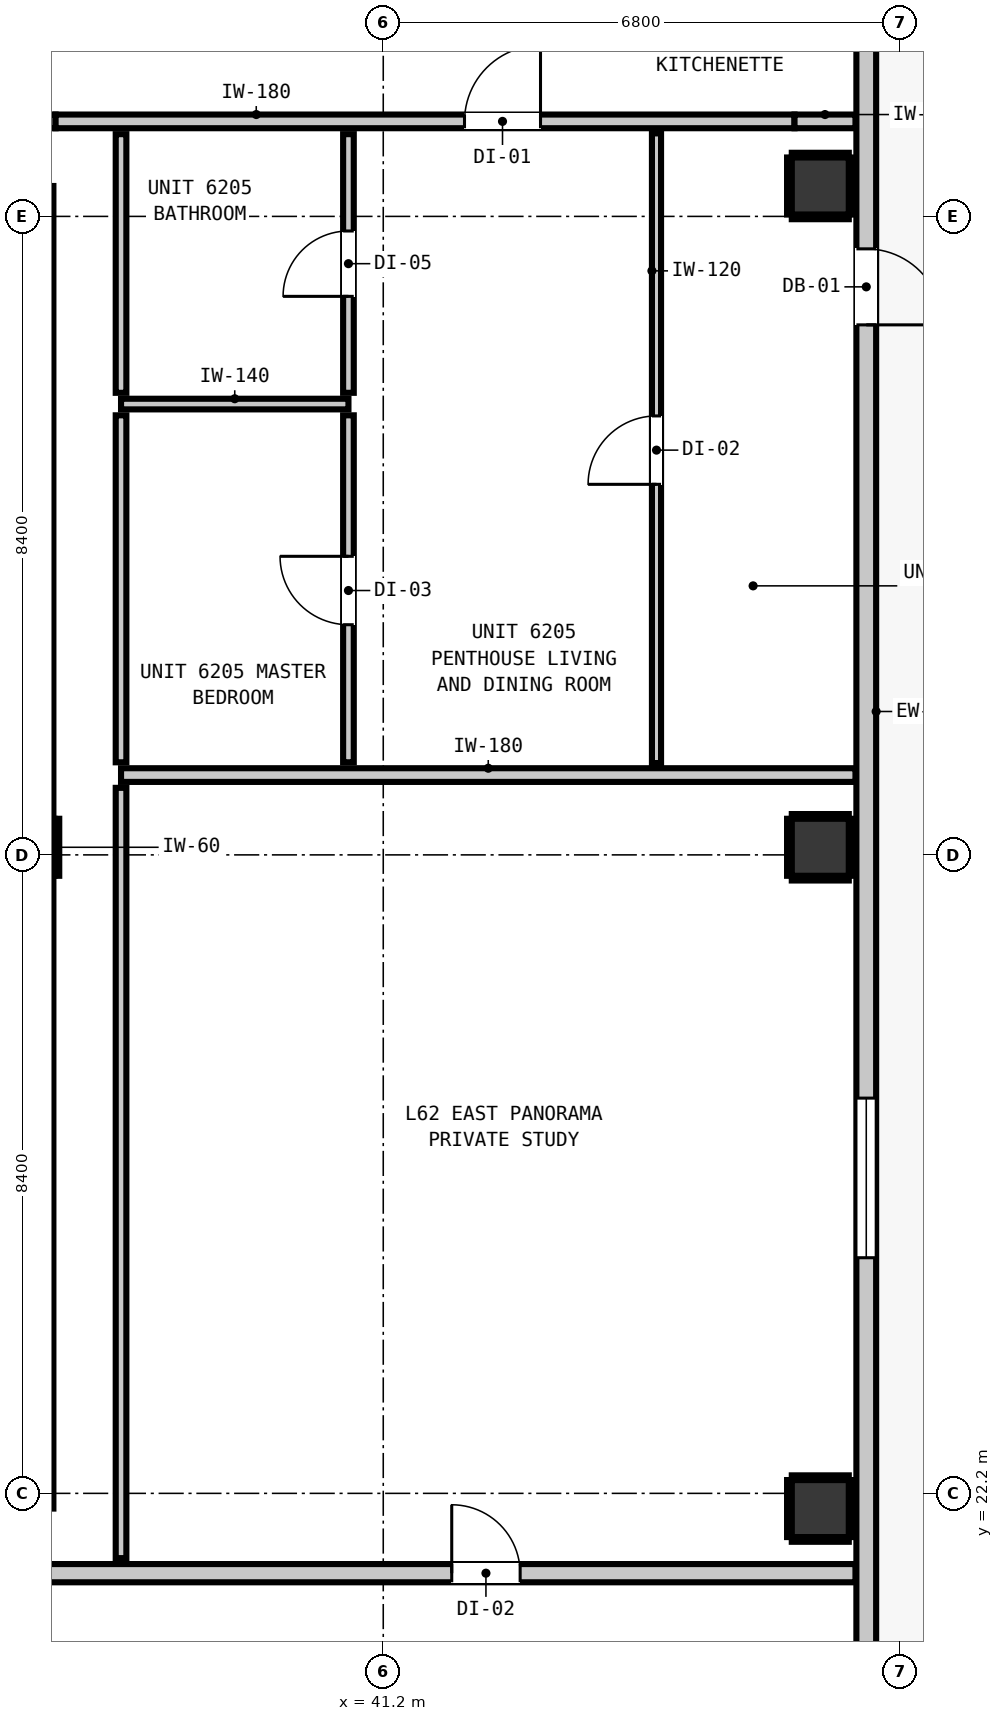
"""IFC4 building model, lengths in metres.
Left out: names, types, materials, properties, quantities, classifications, styles, units other than length and angle.
Written with IfcOpenShell. Run it as: python <this file> out.ifc"""

import sys

from ifc_helpers import new_model, si_unit, direction, frame, frame_2d, origin, origin_2d, place, context, subcontext, project, spatial, rectangle, extrude, element, fill, save


model = new_model("IFC4")
c1 = context("Model", 3, precision=1e-05, world=origin(), true_north=direction((0.0, 1.0)))
c2 = subcontext(c1, "Body", "Model", "MODEL_VIEW")
j1 = project(units=[si_unit("LENGTHUNIT", "METRE"), si_unit("PLANEANGLEUNIT", "RADIAN")], contexts=[c1])
p1 = place(None, origin())
s1 = spatial("IfcSite", under=j1, at=p1, CompositionType="ELEMENT")
p2 = place(p1, origin())
s2 = spatial("IfcBuilding", under=s1, at=p2, CompositionType="ELEMENT")
p3 = place(p2, frame((0.0, 0.0, 213.4)))
s3 = spatial("IfcBuildingStorey", under=s2, at=p3, CompositionType="ELEMENT", Elevation=213.4)
p4 = place(p3, frame((36.5, 30.7, 0.0), z_axis=(0.0, 0.0, 1.0), x_axis=(1.0, 0.0, 0.0)))
e1 = element("IfcColumn", 1, at=p4, inside=s3, PredefinedType="COLUMN", context=c2, shape_type="SweptSolid", body=[
    extrude(rectangle(XDim=0.75, YDim=0.75, at=origin_2d()), origin(), (0.0, 0.0, 1.0), 3.32),
])
p5 = place(p3, frame((36.46, 22.0, 0.0), z_axis=(0.0, 0.0, 1.0), x_axis=(0.0, 1.0, 0.0)))
e2 = element("IfcWall", 2, at=p5, inside=s3, PredefinedType="SHEAR", context=c2, shape_type="SweptSolid", body=[
    extrude(rectangle(XDim=8.32, YDim=0.8, at=frame_2d((4.16, 0.0))), origin(), (0.0, 0.0, 1.0), 3.32),
])
p6 = place(p3, frame((36.46, 31.08, 0.0), z_axis=(0.0, 0.0, 1.0), x_axis=(0.0, 1.0, 0.0)))
e3 = element("IfcWall", 3, at=p6, inside=s3, PredefinedType="SHEAR", context=c2, shape_type="SweptSolid", body=[
    extrude(rectangle(XDim=8.32, YDim=0.8, at=frame_2d((4.16, 0.0))), origin(), (0.0, 0.0, 1.0), 3.32),
])
for number, where, z_axis, x_axis in (
    (4, (46.95, 22.0, 0.0), (0.0, 0.0, 1.0), (1.0, 0.0, 0.0)),
    (5, (46.95, 30.7, 0.0), (0.0, 0.0, 1.0), (1.0, 0.0, 0.0)),
    (6, (46.95, 39.4, 0.0), (0.0, 0.0, 1.0), (1.0, 0.0, 0.0)),
):
    element("IfcColumn", number, at=place(p3, frame(where, z_axis=z_axis, x_axis=x_axis)), inside=s3, PredefinedType="COLUMN", context=c2, shape_type="SweptSolid", body=[
        extrude(rectangle(XDim=0.75, YDim=0.75, at=origin_2d()), origin(), (0.0, 0.0, 1.0), 3.32),
    ])
p7 = place(p3, frame((47.555, 42.655, 0.0), z_axis=(0.0, 0.0, 1.0), x_axis=(0.0, -1.0, 0.0)))
e7 = element("IfcWall", 7, at=p7, inside=s3, PredefinedType="STANDARD", context=c2, shape_type="SweptSolid", body=[
    extrude(rectangle(XDim=30.31, YDim=0.26, at=frame_2d((15.155, 0.0))), origin(), (0.0, 0.0, 1.0), 3.1),
])
p8 = place(p7, frame((4.082, 0.0, 0.0)))
e8 = element("IfcOpeningElement", 8, at=p8, cuts=e7, PredefinedType="OPENING", context=c2, shape_type="SweptSolid", body=[
    extrude(rectangle(XDim=1.0, YDim=2.15, at=frame_2d((0.5, 1.075))), frame((0.0, 0.14, 0.0), z_axis=(0.0, -1.0, 0.0), x_axis=(1.0, 0.0, 0.0)), (0.0, 0.0, 1.0), 0.28),
])
p9 = place(p7, frame((24.101, 0.0, 0.85)))
e9 = element("IfcOpeningElement", 9, at=p9, cuts=e7, PredefinedType="OPENING", context=c2, shape_type="SweptSolid", body=[
    extrude(rectangle(XDim=2.1, YDim=1.9, at=frame_2d((1.05, 0.95))), frame((0.0, 0.14, 0.0), z_axis=(0.0, -1.0, 0.0), x_axis=(1.0, 0.0, 0.0)), (0.0, 0.0, 1.0), 0.28),
])
p10 = place(p7, frame((27.658, 0.0, 0.85)))
e10 = element("IfcOpeningElement", 10, at=p10, cuts=e7, PredefinedType="OPENING", context=c2, shape_type="SweptSolid", body=[
    extrude(rectangle(XDim=2.1, YDim=1.9, at=frame_2d((1.05, 0.95))), frame((0.0, 0.14, 0.0), z_axis=(0.0, -1.0, 0.0), x_axis=(1.0, 0.0, 0.0)), (0.0, 0.0, 1.0), 0.28),
])
p11 = place(p7, frame((15.255, 0.0, 0.85)))
e11 = element("IfcOpeningElement", 11, at=p11, cuts=e7, PredefinedType="OPENING", context=c2, shape_type="SweptSolid", body=[
    extrude(rectangle(XDim=2.1, YDim=1.9, at=frame_2d((1.05, 0.95))), frame((0.0, 0.14, 0.0), z_axis=(0.0, -1.0, 0.0), x_axis=(1.0, 0.0, 0.0)), (0.0, 0.0, 1.0), 0.28),
])
p12 = place(p3, frame((10.787, 21.15, 0.0), z_axis=(0.0, 0.0, 1.0), x_axis=(1.0, 0.0, 0.0)))
e12 = element("IfcWall", 12, at=p12, inside=s3, PredefinedType="PARTITIONING", context=c2, shape_type="SweptSolid", body=[
    extrude(rectangle(XDim=36.626, YDim=0.24, at=frame_2d((18.313, 0.0))), origin(), (0.0, 0.0, 1.0), 3.1),
])
p13 = place(p12, frame((7.423, 0.0, 0.0)))
e13 = element("IfcOpeningElement", 13, at=p13, cuts=e12, PredefinedType="OPENING", context=c2, shape_type="SweptSolid", body=[
    extrude(rectangle(XDim=1.1, YDim=2.15, at=frame_2d((0.55, 1.075))), frame((0.0, 0.13, 0.0), z_axis=(0.0, -1.0, 0.0), x_axis=(1.0, 0.0, 0.0)), (0.0, 0.0, 1.0), 0.26),
])
p14 = place(p12, frame((31.314, 0.0, 0.0)))
e14 = element("IfcOpeningElement", 14, at=p14, cuts=e12, PredefinedType="OPENING", context=c2, shape_type="SweptSolid", body=[
    extrude(rectangle(XDim=0.9, YDim=2.1, at=frame_2d((0.45, 1.05))), frame((0.0, 0.13, 0.0), z_axis=(0.0, -1.0, 0.0), x_axis=(1.0, 0.0, 0.0)), (0.0, 0.0, 1.0), 0.26),
])
p15 = place(p3, frame((37.75, 31.65, 0.0), z_axis=(0.0, 0.0, 1.0), x_axis=(1.0, 0.0, 0.0)))
e15 = element("IfcWall", 15, at=p15, inside=s3, PredefinedType="PARTITIONING", context=c2, shape_type="SweptSolid", body=[
    extrude(rectangle(XDim=9.663, YDim=0.18, at=frame_2d((4.832, 0.0))), origin(), (0.0, 0.0, 1.0), 3.1),
])
p16 = place(p3, frame((10.787, 40.25, 0.0), z_axis=(0.0, 0.0, 1.0), x_axis=(1.0, 0.0, 0.0)))
e16 = element("IfcWall", 16, at=p16, inside=s3, PredefinedType="PARTITIONING", context=c2, shape_type="SweptSolid", body=[
    extrude(rectangle(XDim=26.102, YDim=0.18, at=frame_2d((13.051, 0.0))), origin(), (0.0, 0.0, 1.0), 3.1),
])
p17 = place(p16, frame((6.648, 0.0, 0.0)))
e17 = element("IfcOpeningElement", 17, at=p17, cuts=e16, PredefinedType="OPENING", context=c2, shape_type="SweptSolid", body=[
    extrude(rectangle(XDim=1.4, YDim=2.15, at=frame_2d((0.7, 1.075))), frame((0.0, 0.1, 0.0), z_axis=(0.0, -1.0, 0.0), x_axis=(1.0, 0.0, 0.0)), (0.0, 0.0, 1.0), 0.2),
])
p18 = place(p3, frame((36.889, 40.25, 0.0), z_axis=(0.0, 0.0, 1.0), x_axis=(1.0, 0.0, 0.0)))
e18 = element("IfcWall", 18, at=p18, inside=s3, PredefinedType="PARTITIONING", context=c2, shape_type="SweptSolid", body=[
    extrude(rectangle(XDim=9.722, YDim=0.18, at=frame_2d((4.861, 0.0))), origin(), (0.0, 0.0, 1.0), 2.477),
])
p19 = place(p18, frame((5.38, 0.0, 0.0)))
e19 = element("IfcOpeningElement", 19, at=p19, cuts=e18, PredefinedType="OPENING", context=c2, shape_type="SweptSolid", body=[
    extrude(rectangle(XDim=1.0, YDim=2.15, at=frame_2d((0.5, 1.075))), frame((0.0, 0.1, 0.0), z_axis=(0.0, -1.0, 0.0), x_axis=(1.0, 0.0, 0.0)), (0.0, 0.0, 1.0), 0.2),
])
p20 = place(p3, frame((46.611, 40.25, 0.0), z_axis=(0.0, 0.0, 1.0), x_axis=(1.0, 0.0, 0.0)))
e20 = element("IfcWall", 20, at=p20, inside=s3, PredefinedType="PARTITIONING", context=c2, shape_type="SweptSolid", body=[
    extrude(rectangle(XDim=0.802, YDim=0.18, at=frame_2d((0.401, 0.0))), origin(), (0.0, 0.0, 1.0), 3.1),
])
p21 = place(p3, frame((37.75, 36.531, 0.0), z_axis=(0.0, 0.0, 1.0), x_axis=(1.0, 0.0, 0.0)))
e21 = element("IfcWall", 21, at=p21, inside=s3, PredefinedType="PARTITIONING", context=c2, shape_type="SweptSolid", body=[
    extrude(rectangle(XDim=2.992, YDim=0.14, at=frame_2d((1.496, 0.0))), origin(), (0.0, 0.0, 1.0), 3.1),
])
p22 = place(p3, frame((37.75, 21.348, 0.0), z_axis=(0.0, 0.0, 1.0), x_axis=(0.0, 1.0, 0.0)))
e22 = element("IfcWall", 22, at=p22, inside=s3, PredefinedType="PARTITIONING", context=c2, shape_type="SweptSolid", body=[
    extrude(rectangle(XDim=10.134, YDim=0.14, at=frame_2d((5.067, 0.0))), origin(), (0.0, 0.0, 1.0), 3.1),
])
p23 = place(p3, frame((37.75, 31.818, 0.0), z_axis=(0.0, 0.0, 1.0), x_axis=(0.0, 1.0, 0.0)))
e23 = element("IfcWall", 23, at=p23, inside=s3, PredefinedType="PARTITIONING", context=c2, shape_type="SweptSolid", body=[
    extrude(rectangle(XDim=4.565, YDim=0.14, at=frame_2d((2.282, 0.0))), origin(), (0.0, 0.0, 1.0), 3.1),
])
p24 = place(p3, frame((37.75, 36.679, 0.0), z_axis=(0.0, 0.0, 1.0), x_axis=(0.0, 1.0, 0.0)))
e24 = element("IfcWall", 24, at=p24, inside=s3, PredefinedType="PARTITIONING", context=c2, shape_type="SweptSolid", body=[
    extrude(rectangle(XDim=3.403, YDim=0.14, at=frame_2d((1.702, 0.0))), origin(), (0.0, 0.0, 1.0), 3.1),
])
p25 = place(p3, frame((40.742, 31.818, 0.0), z_axis=(0.0, 0.0, 1.0), x_axis=(0.0, 1.0, 0.0)))
e25 = element("IfcWall", 25, at=p25, inside=s3, PredefinedType="PARTITIONING", context=c2, shape_type="SweptSolid", body=[
    extrude(rectangle(XDim=4.565, YDim=0.14, at=frame_2d((2.282, 0.0))), origin(), (0.0, 0.0, 1.0), 3.1),
])
p26 = place(p25, frame((1.81, 0.0, 0.0)))
e26 = element("IfcOpeningElement", 26, at=p26, cuts=e25, PredefinedType="OPENING", context=c2, shape_type="SweptSolid", body=[
    extrude(rectangle(XDim=0.9, YDim=2.1, at=frame_2d((0.45, 1.05))), frame((0.0, 0.08, 0.0), z_axis=(0.0, -1.0, 0.0), x_axis=(1.0, 0.0, 0.0)), (0.0, 0.0, 1.0), 0.16),
])
p27 = place(p3, frame((40.742, 36.679, 0.0), z_axis=(0.0, 0.0, 1.0), x_axis=(0.0, 1.0, 0.0)))
e27 = element("IfcWall", 27, at=p27, inside=s3, PredefinedType="PARTITIONING", context=c2, shape_type="SweptSolid", body=[
    extrude(rectangle(XDim=3.403, YDim=0.14, at=frame_2d((1.702, 0.0))), origin(), (0.0, 0.0, 1.0), 3.1),
])
p28 = place(p27, frame((1.269, 0.0, 0.0)))
e28 = element("IfcOpeningElement", 28, at=p28, cuts=e27, PredefinedType="OPENING", context=c2, shape_type="SweptSolid", body=[
    extrude(rectangle(XDim=0.86, YDim=2.02, at=frame_2d((0.43, 1.01))), frame((0.0, 0.08, 0.0), z_axis=(0.0, -1.0, 0.0), x_axis=(1.0, 0.0, 0.0)), (0.0, 0.0, 1.0), 0.16),
])
p29 = place(p3, frame((44.795, 31.808, 0.0), z_axis=(0.0, 0.0, 1.0), x_axis=(0.0, 1.0, 0.0)))
e29 = element("IfcWall", 29, at=p29, inside=s3, PredefinedType="PARTITIONING", context=c2, shape_type="SweptSolid", body=[
    extrude(rectangle(XDim=8.284, YDim=0.12, at=frame_2d((4.142, 0.0))), origin(), (0.0, 0.0, 1.0), 3.1),
])
p30 = place(p29, frame((3.667, 0.0, 0.0)))
e30 = element("IfcOpeningElement", 30, at=p30, cuts=e29, PredefinedType="OPENING", context=c2, shape_type="SweptSolid", body=[
    extrude(rectangle(XDim=0.9, YDim=2.1, at=frame_2d((0.45, 1.05))), frame((0.0, 0.07, 0.0), z_axis=(0.0, -1.0, 0.0), x_axis=(1.0, 0.0, 0.0)), (0.0, 0.0, 1.0), 0.14),
])
for number, where, z_axis, x_axis in (
    (31, (36.907, 30.325, 0.0), (0.0, 0.0, 1.0), (0.0, 1.0, 0.0)),
    (32, (46.575, 21.593, 0.0), (0.0, 0.0, 1.0), (1.0, 0.0, 0.0)),
    (33, (46.575, 22.407, 0.0), (0.0, 0.0, 1.0), (1.0, 0.0, 0.0)),
    (34, (46.543, 21.625, 0.0), (0.0, 0.0, 1.0), (0.0, 1.0, 0.0)),
    (35, (47.357, 21.625, 0.0), (0.0, 0.0, 1.0), (0.0, 1.0, 0.0)),
    (36, (46.575, 30.293, 0.0), (0.0, 0.0, 1.0), (1.0, 0.0, 0.0)),
    (37, (46.575, 31.107, 0.0), (0.0, 0.0, 1.0), (1.0, 0.0, 0.0)),
    (38, (46.543, 30.325, 0.0), (0.0, 0.0, 1.0), (0.0, 1.0, 0.0)),
    (39, (47.357, 30.325, 0.0), (0.0, 0.0, 1.0), (0.0, 1.0, 0.0)),
    (40, (46.575, 38.993, 0.0), (0.0, 0.0, 1.0), (1.0, 0.0, 0.0)),
    (41, (46.575, 39.807, 0.0), (0.0, 0.0, 1.0), (1.0, 0.0, 0.0)),
    (42, (46.543, 39.025, 0.0), (0.0, 0.0, 1.0), (0.0, 1.0, 0.0)),
    (43, (47.357, 39.025, 0.0), (0.0, 0.0, 1.0), (0.0, 1.0, 0.0)),
):
    element("IfcWall", number, at=place(p3, frame(where, z_axis=z_axis, x_axis=x_axis)), inside=s3, PredefinedType="PARTITIONING", context=c2, shape_type="SweptSolid", body=[
        extrude(rectangle(XDim=0.75, YDim=0.06, at=frame_2d((0.375, 0.0))), origin(), (0.0, 0.0, 1.0), 1.45),
    ])
p31 = place(p8, origin())
e44 = element("IfcDoor", 44, at=p31, inside=s3, OperationType="SINGLE_SWING_RIGHT", PredefinedType="DOOR", context=c2, shape_type="SweptSolid", body=[
    extrude(rectangle(XDim=1.0, YDim=2.15, at=frame_2d((0.5, 1.075))), frame((0.0, 0.025, 0.0), z_axis=(0.0, -1.0, 0.0), x_axis=(1.0, 0.0, 0.0)), (0.0, 0.0, 1.0), 0.05),
])
fill(e8, e44)
p32 = place(p11, origin())
e45 = element("IfcWindow", 45, at=p32, inside=s3, PartitioningType="SINGLE_PANEL", PredefinedType="WINDOW", context=c2, shape_type="SweptSolid", body=[
    extrude(rectangle(XDim=2.1, YDim=1.9, at=frame_2d((1.05, 0.95))), frame((0.0, 0.03, 0.0), z_axis=(0.0, -1.0, 0.0), x_axis=(1.0, 0.0, 0.0)), (0.0, 0.0, 1.0), 0.06),
])
fill(e11, e45)
p33 = place(p14, origin())
e46 = element("IfcDoor", 46, at=p33, inside=s3, OperationType="SINGLE_SWING_LEFT", PredefinedType="DOOR", context=c2, shape_type="SweptSolid", body=[
    extrude(rectangle(XDim=0.9, YDim=2.1, at=frame_2d((0.45, 1.05))), frame((0.0, 0.025, 0.0), z_axis=(0.0, -1.0, 0.0), x_axis=(1.0, 0.0, 0.0)), (0.0, 0.0, 1.0), 0.05),
])
fill(e14, e46)
p34 = place(p19, origin())
e47 = element("IfcDoor", 47, at=p34, inside=s3, OperationType="SINGLE_SWING_RIGHT", PredefinedType="DOOR", context=c2, shape_type="SweptSolid", body=[
    extrude(rectangle(XDim=1.0, YDim=2.15, at=frame_2d((0.5, 1.075))), frame((0.0, 0.025, 0.0), z_axis=(0.0, -1.0, 0.0), x_axis=(1.0, 0.0, 0.0)), (0.0, 0.0, 1.0), 0.05),
])
fill(e19, e47)
p35 = place(p28, origin())
e48 = element("IfcDoor", 48, at=p35, inside=s3, OperationType="SINGLE_SWING_LEFT", PredefinedType="DOOR", context=c2, shape_type="SweptSolid", body=[
    extrude(rectangle(XDim=0.86, YDim=2.02, at=frame_2d((0.43, 1.01))), frame((0.0, 0.025, 0.0), z_axis=(0.0, -1.0, 0.0), x_axis=(1.0, 0.0, 0.0)), (0.0, 0.0, 1.0), 0.05),
])
fill(e28, e48)
p36 = place(p26, origin())
e49 = element("IfcDoor", 49, at=p36, inside=s3, OperationType="SINGLE_SWING_RIGHT", PredefinedType="DOOR", context=c2, shape_type="SweptSolid", body=[
    extrude(rectangle(XDim=0.9, YDim=2.1, at=frame_2d((0.45, 1.05))), frame((0.0, 0.025, 0.0), z_axis=(0.0, -1.0, 0.0), x_axis=(1.0, 0.0, 0.0)), (0.0, 0.0, 1.0), 0.05),
])
fill(e26, e49)
p37 = place(p30, origin())
e50 = element("IfcDoor", 50, at=p37, inside=s3, OperationType="SINGLE_SWING_LEFT", PredefinedType="DOOR", context=c2, shape_type="SweptSolid", body=[
    extrude(rectangle(XDim=0.9, YDim=2.1, at=frame_2d((0.45, 1.05))), frame((0.0, 0.025, 0.0), z_axis=(0.0, -1.0, 0.0), x_axis=(1.0, 0.0, 0.0)), (0.0, 0.0, 1.0), 0.05),
])
fill(e30, e50)
save(model, sys.argv[1])
